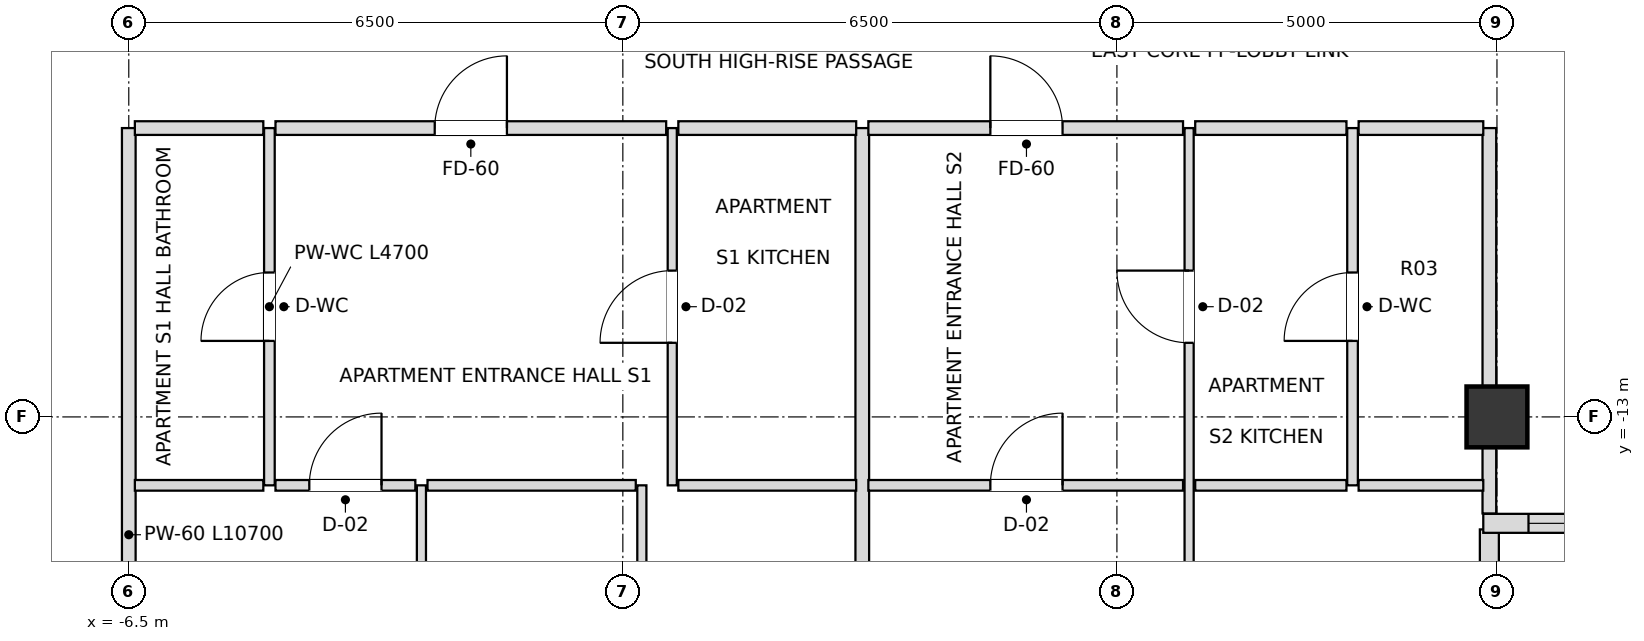
"""IFC4 building model, lengths in metres.
Left out: names, types, materials, properties, quantities, classifications, styles, units other than length and angle.
Written with IfcOpenShell. Run it as: python <this file> out.ifc"""

import sys

from ifc_helpers import new_model, si_unit, direction, frame, frame_2d, origin, origin_2d, place, context, subcontext, project, spatial, rectangle, extrude, element, fill, save


model = new_model("IFC4")
c1 = context("Model", 3, precision=1e-05, world=origin(), true_north=direction((0.0, 1.0)))
c2 = subcontext(c1, "Body", "Model", "MODEL_VIEW")
j1 = project(units=[si_unit("LENGTHUNIT", "METRE"), si_unit("PLANEANGLEUNIT", "RADIAN")], contexts=[c1])
p1 = place(None, origin())
s1 = spatial("IfcSite", under=j1, at=p1, CompositionType="ELEMENT")
p2 = place(p1, origin())
s2 = spatial("IfcBuilding", under=s1, at=p2, CompositionType="ELEMENT")
p3 = place(p2, frame((0.0, 0.0, 233.1)))
s3 = spatial("IfcBuildingStorey", under=s2, at=p3, CompositionType="ELEMENT", Elevation=233.1)
p4 = place(p3, frame((11.5, -13.0, 0.0), z_axis=(0.0, 0.0, 1.0), x_axis=(1.0, 0.0, 0.0)))
e1 = element("IfcColumn", 1, at=p4, inside=s3, PredefinedType="COLUMN", context=c2, shape_type="SweptSolid", body=[
    extrude(rectangle(XDim=0.8, YDim=0.8, at=origin_2d()), origin(), (0.0, 0.0, 1.0), 3.6),
])
p5 = place(p3, frame((11.4, -19.82, 0.0), z_axis=(0.0, 0.0, 1.0), x_axis=(0.0, 1.0, 0.0)))
e2 = element("IfcWall", 2, at=p5, inside=s3, PredefinedType="SOLIDWALL", context=c2, shape_type="SweptSolid", body=[
    extrude(rectangle(XDim=5.34, YDim=0.25, at=frame_2d((2.67, 0.0))), origin(), (0.0, 0.0, 1.0), 2.748),
])
p6 = place(p5, frame((1.925, 0.0, 0.72)))
e3 = element("IfcOpeningElement", 3, at=p6, cuts=e2, PredefinedType="OPENING", context=c2, shape_type="SweptSolid", body=[
    extrude(rectangle(XDim=1.8, YDim=1.68, at=frame_2d((0.9, 0.84))), frame((0.0, 0.135, 0.0), z_axis=(0.0, -1.0, 0.0), x_axis=(1.0, 0.0, 0.0)), (0.0, 0.0, 1.0), 0.27),
])
p7 = place(p3, frame((11.32, -14.4, 0.0), z_axis=(0.0, 0.0, 1.0), x_axis=(1.0, 0.0, 0.0)))
e4 = element("IfcWall", 4, at=p7, inside=s3, PredefinedType="SOLIDWALL", context=c2, shape_type="SweptSolid", body=[
    extrude(rectangle(XDim=5.66, YDim=0.25, at=frame_2d((2.83, 0.0))), origin(), (0.0, 0.0, 1.0), 2.748),
])
p8 = place(p7, frame((0.595, 0.0, 0.72)))
e5 = element("IfcOpeningElement", 5, at=p8, cuts=e4, PredefinedType="OPENING", context=c2, shape_type="SweptSolid", body=[
    extrude(rectangle(XDim=1.8, YDim=1.68, at=frame_2d((0.9, 0.84))), frame((0.0, 0.135, 0.0), z_axis=(0.0, -1.0, 0.0), x_axis=(1.0, 0.0, 0.0)), (0.0, 0.0, 1.0), 0.27),
])
p9 = place(p7, frame((3.265, 0.0, 0.72)))
e6 = element("IfcOpeningElement", 6, at=p9, cuts=e4, PredefinedType="OPENING", context=c2, shape_type="SweptSolid", body=[
    extrude(rectangle(XDim=1.8, YDim=1.68, at=frame_2d((0.9, 0.84))), frame((0.0, 0.135, 0.0), z_axis=(0.0, -1.0, 0.0), x_axis=(1.0, 0.0, 0.0)), (0.0, 0.0, 1.0), 0.27),
])
p10 = place(p3, frame((-6.5, -19.9, 0.0), z_axis=(0.0, 0.0, 1.0), x_axis=(0.0, 1.0, 0.0)))
e7 = element("IfcWall", 7, at=p10, inside=s3, PredefinedType="PARTITIONING", context=c2, shape_type="SweptSolid", body=[
    extrude(rectangle(XDim=10.7, YDim=0.18, at=frame_2d((5.35, 0.0))), origin(), (0.0, 0.0, 1.0), 2.826),
])
p11 = place(p3, frame((-4.65, -13.9, 0.0), z_axis=(0.0, 0.0, 1.0), x_axis=(0.0, 1.0, 0.0)))
e8 = element("IfcWall", 8, at=p11, inside=s3, PredefinedType="PARTITIONING", context=c2, shape_type="SweptSolid", body=[
    extrude(rectangle(XDim=4.7, YDim=0.14, at=frame_2d((2.35, 0.0))), origin(), (0.0, 0.0, 1.0), 3.38),
])
p12 = place(p11, frame((1.9, 0.0, 0.0)))
e9 = element("IfcOpeningElement", 9, at=p12, cuts=e8, PredefinedType="OPENING", context=c2, shape_type="SweptSolid", body=[
    extrude(rectangle(XDim=0.9, YDim=2.1, at=frame_2d((0.45, 1.05))), frame((0.0, 0.08, 0.0), z_axis=(0.0, -1.0, 0.0), x_axis=(1.0, 0.0, 0.0)), (0.0, 0.0, 1.0), 0.16),
])
p13 = place(p3, frame((-2.65, -19.9, 0.0), z_axis=(0.0, 0.0, 1.0), x_axis=(0.0, 1.0, 0.0)))
e10 = element("IfcWall", 10, at=p13, inside=s3, PredefinedType="PARTITIONING", context=c2, shape_type="SweptSolid", body=[
    extrude(rectangle(XDim=6.0, YDim=0.12, at=frame_2d((3.0, 0.0))), origin(), (0.0, 0.0, 1.0), 3.018),
])
p14 = place(p13, frame((2.55, 0.0, 0.0)))
e11 = element("IfcOpeningElement", 11, at=p14, cuts=e10, PredefinedType="OPENING", context=c2, shape_type="SweptSolid", body=[
    extrude(rectangle(XDim=0.9, YDim=2.1, at=frame_2d((0.45, 1.05))), frame((0.0, 0.07, 0.0), z_axis=(0.0, -1.0, 0.0), x_axis=(1.0, 0.0, 0.0)), (0.0, 0.0, 1.0), 0.14),
])
p15 = place(p3, frame((0.25, -19.9, 0.0), z_axis=(0.0, 0.0, 1.0), x_axis=(0.0, 1.0, 0.0)))
e12 = element("IfcWall", 12, at=p15, inside=s3, PredefinedType="PARTITIONING", context=c2, shape_type="SweptSolid", body=[
    extrude(rectangle(XDim=6.0, YDim=0.12, at=frame_2d((3.0, 0.0))), origin(), (0.0, 0.0, 1.0), 3.018),
])
p16 = place(p15, frame((2.55, 0.0, 0.0)))
e13 = element("IfcOpeningElement", 13, at=p16, cuts=e12, PredefinedType="OPENING", context=c2, shape_type="SweptSolid", body=[
    extrude(rectangle(XDim=0.9, YDim=2.1, at=frame_2d((0.45, 1.05))), frame((0.0, 0.07, 0.0), z_axis=(0.0, -1.0, 0.0), x_axis=(1.0, 0.0, 0.0)), (0.0, 0.0, 1.0), 0.14),
])
p17 = place(p3, frame((0.65, -13.9, 0.0), z_axis=(0.0, 0.0, 1.0), x_axis=(0.0, 1.0, 0.0)))
e14 = element("IfcWall", 14, at=p17, inside=s3, PredefinedType="PARTITIONING", context=c2, shape_type="SweptSolid", body=[
    extrude(rectangle(XDim=4.7, YDim=0.12, at=frame_2d((2.35, 0.0))), origin(), (0.0, 0.0, 1.0), 3.38),
])
p18 = place(p17, frame((1.875, 0.0, 0.0)))
e15 = element("IfcOpeningElement", 15, at=p18, cuts=e14, PredefinedType="OPENING", context=c2, shape_type="SweptSolid", body=[
    extrude(rectangle(XDim=0.95, YDim=2.1, at=frame_2d((0.475, 1.05))), frame((0.0, 0.07, 0.0), z_axis=(0.0, -1.0, 0.0), x_axis=(1.0, 0.0, 0.0)), (0.0, 0.0, 1.0), 0.14),
])
p19 = place(p3, frame((3.15, -19.9, 0.0), z_axis=(0.0, 0.0, 1.0), x_axis=(0.0, 1.0, 0.0)))
e16 = element("IfcWall", 16, at=p19, inside=s3, PredefinedType="PARTITIONING", context=c2, shape_type="SweptSolid", body=[
    extrude(rectangle(XDim=10.7, YDim=0.18, at=frame_2d((5.35, 0.0))), origin(), (0.0, 0.0, 1.0), 3.018),
])
p20 = place(p3, frame((7.45, -19.9, 0.0), z_axis=(0.0, 0.0, 1.0), x_axis=(0.0, 1.0, 0.0)))
e17 = element("IfcWall", 17, at=p20, inside=s3, PredefinedType="PARTITIONING", context=c2, shape_type="SweptSolid", body=[
    extrude(rectangle(XDim=10.7, YDim=0.12, at=frame_2d((5.35, 0.0))), origin(), (0.0, 0.0, 1.0), 2.826),
])
p21 = place(p20, frame((7.875, 0.0, 0.0)))
e18 = element("IfcOpeningElement", 18, at=p21, cuts=e17, PredefinedType="OPENING", context=c2, shape_type="SweptSolid", body=[
    extrude(rectangle(XDim=0.95, YDim=2.1, at=frame_2d((0.475, 1.05))), frame((0.0, 0.07, 0.0), z_axis=(0.0, -1.0, 0.0), x_axis=(1.0, 0.0, 0.0)), (0.0, 0.0, 1.0), 0.14),
])
p22 = place(p20, frame((2.55, 0.0, 0.0)))
e19 = element("IfcOpeningElement", 19, at=p22, cuts=e17, PredefinedType="OPENING", context=c2, shape_type="SweptSolid", body=[
    extrude(rectangle(XDim=0.9, YDim=2.1, at=frame_2d((0.45, 1.05))), frame((0.0, 0.07, 0.0), z_axis=(0.0, -1.0, 0.0), x_axis=(1.0, 0.0, 0.0)), (0.0, 0.0, 1.0), 0.14),
])
p23 = place(p3, frame((9.6, -13.9, 0.0), z_axis=(0.0, 0.0, 1.0), x_axis=(0.0, 1.0, 0.0)))
e20 = element("IfcWall", 20, at=p23, inside=s3, PredefinedType="PARTITIONING", context=c2, shape_type="SweptSolid", body=[
    extrude(rectangle(XDim=4.7, YDim=0.14, at=frame_2d((2.35, 0.0))), origin(), (0.0, 0.0, 1.0), 2.826),
])
p24 = place(p23, frame((1.9, 0.0, 0.0)))
e21 = element("IfcOpeningElement", 21, at=p24, cuts=e20, PredefinedType="OPENING", context=c2, shape_type="SweptSolid", body=[
    extrude(rectangle(XDim=0.9, YDim=2.1, at=frame_2d((0.45, 1.05))), frame((0.0, 0.08, 0.0), z_axis=(0.0, -1.0, 0.0), x_axis=(1.0, 0.0, 0.0)), (0.0, 0.0, 1.0), 0.16),
])
p25 = place(p3, frame((11.4, -14.27, 0.0), z_axis=(0.0, 0.0, 1.0), x_axis=(0.0, 1.0, 0.0)))
e22 = element("IfcWall", 22, at=p25, inside=s3, PredefinedType="PARTITIONING", context=c2, shape_type="SweptSolid", body=[
    extrude(rectangle(XDim=5.07, YDim=0.18, at=frame_2d((2.535, 0.0))), origin(), (0.0, 0.0, 1.0), 2.748),
])
p26 = place(p3, frame((-6.42, -13.9, 0.0), z_axis=(0.0, 0.0, 1.0), x_axis=(1.0, 0.0, 0.0)))
e23 = element("IfcWall", 23, at=p26, inside=s3, PredefinedType="PARTITIONING", context=c2, shape_type="SweptSolid", body=[
    extrude(rectangle(XDim=1.69, YDim=0.14, at=frame_2d((0.845, 0.0))), origin(), (0.0, 0.0, 1.0), 3.38),
])
p27 = place(p3, frame((-4.57, -13.9, 0.0), z_axis=(0.0, 0.0, 1.0), x_axis=(1.0, 0.0, 0.0)))
e24 = element("IfcWall", 24, at=p27, inside=s3, PredefinedType="PARTITIONING", context=c2, shape_type="SweptSolid", body=[
    extrude(rectangle(XDim=1.84, YDim=0.14, at=frame_2d((0.92, 0.0))), origin(), (0.0, 0.0, 1.0), 3.38),
])
p28 = place(p27, frame((0.445, 0.0, 0.0)))
e25 = element("IfcOpeningElement", 25, at=p28, cuts=e24, PredefinedType="OPENING", context=c2, shape_type="SweptSolid", body=[
    extrude(rectangle(XDim=0.95, YDim=2.1, at=frame_2d((0.475, 1.05))), frame((0.0, 0.08, 0.0), z_axis=(0.0, -1.0, 0.0), x_axis=(1.0, 0.0, 0.0)), (0.0, 0.0, 1.0), 0.16),
])
p29 = place(p3, frame((-2.57, -13.9, 0.0), z_axis=(0.0, 0.0, 1.0), x_axis=(1.0, 0.0, 0.0)))
e26 = element("IfcWall", 26, at=p29, inside=s3, PredefinedType="PARTITIONING", context=c2, shape_type="SweptSolid", body=[
    extrude(rectangle(XDim=2.74, YDim=0.14, at=frame_2d((1.37, 0.0))), origin(), (0.0, 0.0, 1.0), 3.38),
])
p30 = place(p3, frame((0.73, -13.9, 0.0), z_axis=(0.0, 0.0, 1.0), x_axis=(1.0, 0.0, 0.0)))
e27 = element("IfcWall", 27, at=p30, inside=s3, PredefinedType="PARTITIONING", context=c2, shape_type="SweptSolid", body=[
    extrude(rectangle(XDim=2.34, YDim=0.14, at=frame_2d((1.17, 0.0))), origin(), (0.0, 0.0, 1.0), 3.38),
])
p31 = place(p3, frame((3.23, -13.9, 0.0), z_axis=(0.0, 0.0, 1.0), x_axis=(1.0, 0.0, 0.0)))
e28 = element("IfcWall", 28, at=p31, inside=s3, PredefinedType="PARTITIONING", context=c2, shape_type="SweptSolid", body=[
    extrude(rectangle(XDim=4.14, YDim=0.14, at=frame_2d((2.07, 0.0))), origin(), (0.0, 0.0, 1.0), 2.826),
])
p32 = place(p31, frame((1.605, 0.0, 0.0)))
e29 = element("IfcOpeningElement", 29, at=p32, cuts=e28, PredefinedType="OPENING", context=c2, shape_type="SweptSolid", body=[
    extrude(rectangle(XDim=0.95, YDim=2.1, at=frame_2d((0.475, 1.05))), frame((0.0, 0.08, 0.0), z_axis=(0.0, -1.0, 0.0), x_axis=(1.0, 0.0, 0.0)), (0.0, 0.0, 1.0), 0.16),
])
p33 = place(p3, frame((7.53, -13.9, 0.0), z_axis=(0.0, 0.0, 1.0), x_axis=(1.0, 0.0, 0.0)))
e30 = element("IfcWall", 30, at=p33, inside=s3, PredefinedType="PARTITIONING", context=c2, shape_type="SweptSolid", body=[
    extrude(rectangle(XDim=1.99, YDim=0.14, at=frame_2d((0.995, 0.0))), origin(), (0.0, 0.0, 1.0), 3.38),
])
p34 = place(p3, frame((9.68, -13.9, 0.0), z_axis=(0.0, 0.0, 1.0), x_axis=(1.0, 0.0, 0.0)))
e31 = element("IfcWall", 31, at=p34, inside=s3, PredefinedType="PARTITIONING", context=c2, shape_type="SweptSolid", body=[
    extrude(rectangle(XDim=1.64, YDim=0.14, at=frame_2d((0.82, 0.0))), origin(), (0.0, 0.0, 1.0), 3.38),
])
p35 = place(p3, frame((-6.42, -9.2, 0.0), z_axis=(0.0, 0.0, 1.0), x_axis=(1.0, 0.0, 0.0)))
e32 = element("IfcWall", 32, at=p35, inside=s3, PredefinedType="PARTITIONING", context=c2, shape_type="SweptSolid", body=[
    extrude(rectangle(XDim=1.69, YDim=0.18, at=frame_2d((0.845, 0.0))), origin(), (0.0, 0.0, 1.0), 3.38),
])
p36 = place(p3, frame((-4.57, -9.2, 0.0), z_axis=(0.0, 0.0, 1.0), x_axis=(1.0, 0.0, 0.0)))
e33 = element("IfcWall", 33, at=p36, inside=s3, PredefinedType="PARTITIONING", context=c2, shape_type="SweptSolid", body=[
    extrude(rectangle(XDim=5.14, YDim=0.18, at=frame_2d((2.57, 0.0))), origin(), (0.0, 0.0, 1.0), 3.38),
])
p37 = place(p36, frame((2.095, 0.0, 0.0)))
e34 = element("IfcOpeningElement", 34, at=p37, cuts=e33, PredefinedType="OPENING", context=c2, shape_type="SweptSolid", body=[
    extrude(rectangle(XDim=0.95, YDim=2.15, at=frame_2d((0.475, 1.075))), frame((0.0, 0.1, 0.0), z_axis=(0.0, -1.0, 0.0), x_axis=(1.0, 0.0, 0.0)), (0.0, 0.0, 1.0), 0.2),
])
p38 = place(p3, frame((0.73, -9.2, 0.0), z_axis=(0.0, 0.0, 1.0), x_axis=(1.0, 0.0, 0.0)))
e35 = element("IfcWall", 35, at=p38, inside=s3, PredefinedType="PARTITIONING", context=c2, shape_type="SweptSolid", body=[
    extrude(rectangle(XDim=2.34, YDim=0.18, at=frame_2d((1.17, 0.0))), origin(), (0.0, 0.0, 1.0), 3.38),
])
p39 = place(p3, frame((3.23, -9.2, 0.0), z_axis=(0.0, 0.0, 1.0), x_axis=(1.0, 0.0, 0.0)))
e36 = element("IfcWall", 36, at=p39, inside=s3, PredefinedType="PARTITIONING", context=c2, shape_type="SweptSolid", body=[
    extrude(rectangle(XDim=4.14, YDim=0.18, at=frame_2d((2.07, 0.0))), origin(), (0.0, 0.0, 1.0), 2.826),
])
p40 = place(p39, frame((1.605, 0.0, 0.0)))
e37 = element("IfcOpeningElement", 37, at=p40, cuts=e36, PredefinedType="OPENING", context=c2, shape_type="SweptSolid", body=[
    extrude(rectangle(XDim=0.95, YDim=2.15, at=frame_2d((0.475, 1.075))), frame((0.0, 0.1, 0.0), z_axis=(0.0, -1.0, 0.0), x_axis=(1.0, 0.0, 0.0)), (0.0, 0.0, 1.0), 0.2),
])
p41 = place(p3, frame((7.53, -9.2, 0.0), z_axis=(0.0, 0.0, 1.0), x_axis=(1.0, 0.0, 0.0)))
e38 = element("IfcWall", 38, at=p41, inside=s3, PredefinedType="PARTITIONING", context=c2, shape_type="SweptSolid", body=[
    extrude(rectangle(XDim=1.99, YDim=0.18, at=frame_2d((0.995, 0.0))), origin(), (0.0, 0.0, 1.0), 3.38),
])
p42 = place(p3, frame((9.68, -9.2, 0.0), z_axis=(0.0, 0.0, 1.0), x_axis=(1.0, 0.0, 0.0)))
e39 = element("IfcWall", 39, at=p42, inside=s3, PredefinedType="PARTITIONING", context=c2, shape_type="SweptSolid", body=[
    extrude(rectangle(XDim=1.64, YDim=0.18, at=frame_2d((0.82, 0.0))), origin(), (0.0, 0.0, 1.0), 3.38),
])
p43 = place(p8, origin())
e40 = element("IfcWindow", 40, at=p43, inside=s3, PartitioningType="SINGLE_PANEL", PredefinedType="WINDOW", context=c2, shape_type="SweptSolid", body=[
    extrude(rectangle(XDim=1.8, YDim=1.68, at=frame_2d((0.9, 0.84))), frame((0.0, 0.03, 0.0), z_axis=(0.0, -1.0, 0.0), x_axis=(1.0, 0.0, 0.0)), (0.0, 0.0, 1.0), 0.06),
])
fill(e5, e40)
p44 = place(p12, origin())
e41 = element("IfcDoor", 41, at=p44, inside=s3, OperationType="SINGLE_SWING_LEFT", PredefinedType="DOOR", context=c2, shape_type="SweptSolid", body=[
    extrude(rectangle(XDim=0.9, YDim=2.1, at=frame_2d((0.45, 1.05))), frame((0.0, 0.025, 0.0), z_axis=(0.0, -1.0, 0.0), x_axis=(1.0, 0.0, 0.0)), (0.0, 0.0, 1.0), 0.05),
])
fill(e9, e41)
p45 = place(p37, origin())
e42 = element("IfcDoor", 42, at=p45, inside=s3, OperationType="SINGLE_SWING_RIGHT", PredefinedType="DOOR", context=c2, shape_type="SweptSolid", body=[
    extrude(rectangle(XDim=0.95, YDim=2.15, at=frame_2d((0.475, 1.075))), frame((0.0, 0.025, 0.0), z_axis=(0.0, -1.0, 0.0), x_axis=(1.0, 0.0, 0.0)), (0.0, 0.0, 1.0), 0.05),
])
fill(e34, e42)
p46 = place(p18, origin())
e43 = element("IfcDoor", 43, at=p46, inside=s3, OperationType="SINGLE_SWING_LEFT", PredefinedType="DOOR", context=c2, shape_type="SweptSolid", body=[
    extrude(rectangle(XDim=0.95, YDim=2.1, at=frame_2d((0.475, 1.05))), frame((0.0, 0.025, 0.0), z_axis=(0.0, -1.0, 0.0), x_axis=(1.0, 0.0, 0.0)), (0.0, 0.0, 1.0), 0.05),
])
fill(e15, e43)
p47 = place(p28, origin())
e44 = element("IfcDoor", 44, at=p47, inside=s3, OperationType="SINGLE_SWING_RIGHT", PredefinedType="DOOR", context=c2, shape_type="SweptSolid", body=[
    extrude(rectangle(XDim=0.95, YDim=2.1, at=frame_2d((0.475, 1.05))), frame((0.0, 0.025, 0.0), z_axis=(0.0, -1.0, 0.0), x_axis=(1.0, 0.0, 0.0)), (0.0, 0.0, 1.0), 0.05),
])
fill(e25, e44)
p48 = place(p40, origin())
e45 = element("IfcDoor", 45, at=p48, inside=s3, OperationType="SINGLE_SWING_LEFT", PredefinedType="DOOR", context=c2, shape_type="SweptSolid", body=[
    extrude(rectangle(XDim=0.95, YDim=2.15, at=frame_2d((0.475, 1.075))), frame((0.0, 0.025, 0.0), z_axis=(0.0, -1.0, 0.0), x_axis=(1.0, 0.0, 0.0)), (0.0, 0.0, 1.0), 0.05),
])
fill(e37, e45)
p49 = place(p21, origin())
e46 = element("IfcDoor", 46, at=p49, inside=s3, OperationType="SINGLE_SWING_RIGHT", PredefinedType="DOOR", context=c2, shape_type="SweptSolid", body=[
    extrude(rectangle(XDim=0.95, YDim=2.1, at=frame_2d((0.475, 1.05))), frame((0.0, 0.025, 0.0), z_axis=(0.0, -1.0, 0.0), x_axis=(1.0, 0.0, 0.0)), (0.0, 0.0, 1.0), 0.05),
])
fill(e18, e46)
p50 = place(p24, origin())
e47 = element("IfcDoor", 47, at=p50, inside=s3, OperationType="SINGLE_SWING_LEFT", PredefinedType="DOOR", context=c2, shape_type="SweptSolid", body=[
    extrude(rectangle(XDim=0.9, YDim=2.1, at=frame_2d((0.45, 1.05))), frame((0.0, 0.025, 0.0), z_axis=(0.0, -1.0, 0.0), x_axis=(1.0, 0.0, 0.0)), (0.0, 0.0, 1.0), 0.05),
])
fill(e21, e47)
p51 = place(p32, origin())
e48 = element("IfcDoor", 48, at=p51, inside=s3, OperationType="SINGLE_SWING_RIGHT", PredefinedType="DOOR", context=c2, shape_type="SweptSolid", body=[
    extrude(rectangle(XDim=0.95, YDim=2.1, at=frame_2d((0.475, 1.05))), frame((0.0, 0.025, 0.0), z_axis=(0.0, -1.0, 0.0), x_axis=(1.0, 0.0, 0.0)), (0.0, 0.0, 1.0), 0.05),
])
fill(e29, e48)
save(model, sys.argv[1])
